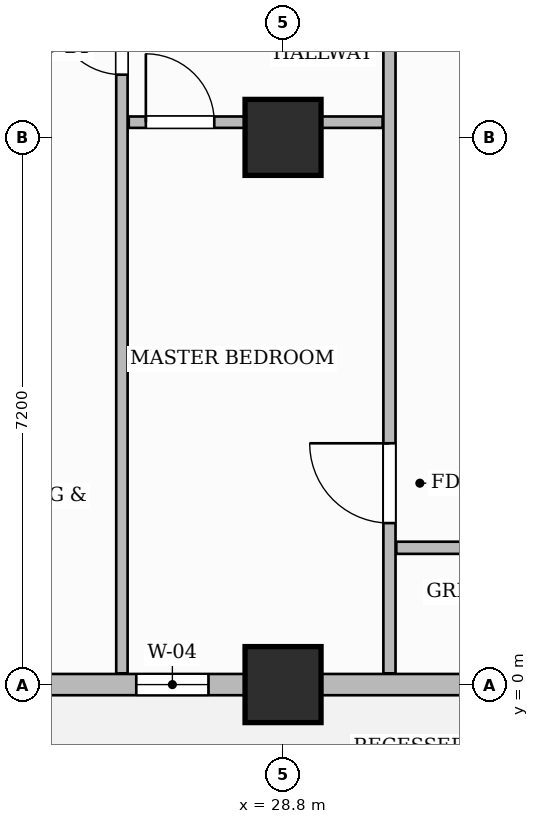
"""IFC4 building model, lengths in metres.
Left out: names, types, materials, properties, quantities, classifications, styles, units other than length and angle.
Written with IfcOpenShell. Run it as: python <this file> out.ifc"""

import sys

from ifc_helpers import new_model, si_unit, direction, frame, frame_2d, origin, origin_2d, place, context, subcontext, project, spatial, rectangle, extrude, source, transform, mapped, element, fill, save


model = new_model("IFC4")
c1 = context("Model", 3, precision=1e-05, world=origin(), true_north=direction((0.0, 1.0)))
c2 = subcontext(c1, "Body", "Model", "MODEL_VIEW")
j1 = project(units=[si_unit("LENGTHUNIT", "METRE"), si_unit("PLANEANGLEUNIT", "RADIAN")], contexts=[c1])
p1 = place(None, origin())
s1 = spatial("IfcSite", under=j1, at=p1, CompositionType="ELEMENT")
p2 = place(p1, origin())
s2 = spatial("IfcBuilding", under=s1, at=p2, CompositionType="ELEMENT")
p3 = place(p2, frame((0.0, 0.0, 188.8)))
s3 = spatial("IfcBuildingStorey", under=s2, at=p3, CompositionType="ELEMENT", Elevation=188.8)
m1 = source(origin(), c2, "Body", "SweptSolid", [
    extrude(rectangle(XDim=1.0, YDim=1.0, at=origin_2d()), origin(), (0.0, 0.0, 1.0), 3.85),
])
for number, where, z_axis, x_axis in (
    (1, (28.8, 0.0, 0.0), (0.0, 0.0, 1.0), (1.0, 0.0, 0.0)),
    (2, (28.8, 7.2, 0.0), (0.0, 0.0, 1.0), (1.0, 0.0, 0.0)),
):
    element("IfcColumn", number, at=place(p3, frame(where, z_axis=z_axis, x_axis=x_axis)), inside=s3, PredefinedType="COLUMN", context=c2, shape_type="MappedRepresentation", body=[
        mapped(m1, transform((0.0, 0.0, 0.0), scale=1.0)),
    ])
p4 = place(p3, frame((30.2, 0.148, 0.0), z_axis=(0.0, 0.0, 1.0), x_axis=(0.0, 1.0, 0.0)))
e3 = element("IfcWall", 3, at=p4, inside=s3, PredefinedType="PARTITIONING", context=c2, shape_type="SweptSolid", body=[
    extrude(rectangle(XDim=9.312, YDim=0.16, at=frame_2d((4.656, 0.0))), origin(), (0.0, 0.0, 1.0), 3.6),
])
p5 = place(p4, frame((1.977, 0.0, 0.0)))
e4 = element("IfcOpeningElement", 4, at=p5, cuts=e3, PredefinedType="OPENING", context=c2, shape_type="SweptSolid", body=[
    extrude(rectangle(XDim=1.05, YDim=2.15, at=frame_2d((0.525, 1.075))), frame((0.0, 0.09, 0.0), z_axis=(0.0, -1.0, 0.0), x_axis=(1.0, 0.0, 0.0)), (0.0, 0.0, 1.0), 0.18),
])
p6 = place(p3, frame((30.29, 1.8, 0.0), z_axis=(0.0, 0.0, 1.0), x_axis=(1.0, 0.0, 0.0)))
e5 = element("IfcWall", 5, at=p6, inside=s3, PredefinedType="PARTITIONING", context=c2, shape_type="SweptSolid", body=[
    extrude(rectangle(XDim=19.37, YDim=0.16, at=frame_2d((9.685, 0.0))), origin(), (0.0, 0.0, 1.0), 3.6),
])
p7 = place(p6, frame((2.916, 0.0, 0.0)))
e6 = element("IfcOpeningElement", 6, at=p7, cuts=e5, PredefinedType="OPENING", context=c2, shape_type="SweptSolid", body=[
    extrude(rectangle(XDim=0.9, YDim=2.15, at=frame_2d((0.45, 1.075))), frame((0.0, 0.09, 0.0), z_axis=(0.0, -1.0, 0.0), x_axis=(1.0, 0.0, 0.0)), (0.0, 0.0, 1.0), 0.18),
])
p8 = place(p6, frame((9.66, 0.0, 0.0)))
e7 = element("IfcOpeningElement", 7, at=p8, cuts=e5, PredefinedType="OPENING", context=c2, shape_type="SweptSolid", body=[
    extrude(rectangle(XDim=0.9, YDim=2.15, at=frame_2d((0.45, 1.075))), frame((0.0, 0.09, 0.0), z_axis=(0.0, -1.0, 0.0), x_axis=(1.0, 0.0, 0.0)), (0.0, 0.0, 1.0), 0.18),
])
p9 = place(p6, frame((15.86, 0.0, 0.0)))
e8 = element("IfcOpeningElement", 8, at=p9, cuts=e5, PredefinedType="OPENING", context=c2, shape_type="SweptSolid", body=[
    extrude(rectangle(XDim=0.9, YDim=2.15, at=frame_2d((0.45, 1.075))), frame((0.0, 0.09, 0.0), z_axis=(0.0, -1.0, 0.0), x_axis=(1.0, 0.0, 0.0)), (0.0, 0.0, 1.0), 0.18),
])
p10 = place(p3, frame((26.68, 0.148, 0.0), z_axis=(0.0, 0.0, 1.0), x_axis=(0.0, 1.0, 0.0)))
e9 = element("IfcWall", 9, at=p10, inside=s3, PredefinedType="PARTITIONING", context=c2, shape_type="SweptSolid", body=[
    extrude(rectangle(XDim=9.312, YDim=0.15, at=frame_2d((4.656, 0.0))), origin(), (0.0, 0.0, 1.0), 3.6),
])
p11 = place(p10, frame((7.877, 0.0, 0.0)))
e10 = element("IfcOpeningElement", 10, at=p11, cuts=e9, PredefinedType="OPENING", context=c2, shape_type="SweptSolid", body=[
    extrude(rectangle(XDim=0.9, YDim=2.15, at=frame_2d((0.45, 1.075))), frame((0.0, 0.085, 0.0), z_axis=(0.0, -1.0, 0.0), x_axis=(1.0, 0.0, 0.0)), (0.0, 0.0, 1.0), 0.17),
])
p12 = place(p3, frame((26.77, 7.4, 0.0), z_axis=(0.0, 0.0, 1.0), x_axis=(1.0, 0.0, 0.0)))
e11 = element("IfcWall", 11, at=p12, inside=s3, PredefinedType="PARTITIONING", context=c2, shape_type="SweptSolid", body=[
    extrude(rectangle(XDim=3.34, YDim=0.15, at=frame_2d((1.67, 0.0))), origin(), (0.0, 0.0, 1.0), 3.085),
])
p13 = place(p12, frame((0.225, 0.0, 0.0)))
e12 = element("IfcOpeningElement", 12, at=p13, cuts=e11, PredefinedType="OPENING", context=c2, shape_type="SweptSolid", body=[
    extrude(rectangle(XDim=0.9, YDim=2.15, at=frame_2d((0.45, 1.075))), frame((0.0, 0.085, 0.0), z_axis=(0.0, -1.0, 0.0), x_axis=(1.0, 0.0, 0.0)), (0.0, 0.0, 1.0), 0.17),
])
p14 = place(p3, frame((14.4, 0.0, 0.0), z_axis=(0.0, 0.0, 1.0), x_axis=(1.0, 0.0, 0.0)))
e13 = element("IfcWall", 13, at=p14, inside=s3, PredefinedType="SOLIDWALL", context=c2, shape_type="SweptSolid", body=[
    extrude(rectangle(XDim=35.4, YDim=0.28, at=frame_2d((17.7, 0.0))), origin(), (0.0, 0.0, 1.0), 3.085),
])
p15 = place(p14, frame((0.85, 0.0, 0.0)))
e14 = element("IfcOpeningElement", 14, at=p15, cuts=e13, PredefinedType="OPENING", context=c2, shape_type="SweptSolid", body=[
    extrude(rectangle(XDim=1.2, YDim=2.2, at=frame_2d((0.6, 1.1))), frame((0.0, 0.15, 0.0), z_axis=(0.0, -1.0, 0.0), x_axis=(1.0, 0.0, 0.0)), (0.0, 0.0, 1.0), 0.3),
])
p16 = place(p14, frame((2.596, 0.0, 0.8)))
e15 = element("IfcOpeningElement", 15, at=p16, cuts=e13, PredefinedType="OPENING", context=c2, shape_type="SweptSolid", body=[
    extrude(rectangle(XDim=0.95, YDim=1.75, at=frame_2d((0.475, 0.875))), frame((0.0, 0.15, 0.0), z_axis=(0.0, -1.0, 0.0), x_axis=(1.0, 0.0, 0.0)), (0.0, 0.0, 1.0), 0.3),
])
p17 = place(p14, frame((4.204, 0.0, 0.8)))
e16 = element("IfcOpeningElement", 16, at=p17, cuts=e13, PredefinedType="OPENING", context=c2, shape_type="SweptSolid", body=[
    extrude(rectangle(XDim=1.8, YDim=1.85, at=frame_2d((0.9, 0.925))), frame((0.0, 0.15, 0.0), z_axis=(0.0, -1.0, 0.0), x_axis=(1.0, 0.0, 0.0)), (0.0, 0.0, 1.0), 0.3),
])
p18 = place(p14, frame((9.415, 0.0, 0.8)))
e17 = element("IfcOpeningElement", 17, at=p18, cuts=e13, PredefinedType="OPENING", context=c2, shape_type="SweptSolid", body=[
    extrude(rectangle(XDim=1.8, YDim=1.85, at=frame_2d((0.9, 0.925))), frame((0.0, 0.15, 0.0), z_axis=(0.0, -1.0, 0.0), x_axis=(1.0, 0.0, 0.0)), (0.0, 0.0, 1.0), 0.3),
])
p19 = place(p14, frame((12.469, 0.0, 0.8)))
e18 = element("IfcOpeningElement", 18, at=p19, cuts=e13, PredefinedType="OPENING", context=c2, shape_type="SweptSolid", body=[
    extrude(rectangle(XDim=0.95, YDim=1.75, at=frame_2d((0.475, 0.875))), frame((0.0, 0.15, 0.0), z_axis=(0.0, -1.0, 0.0), x_axis=(1.0, 0.0, 0.0)), (0.0, 0.0, 1.0), 0.3),
])
p20 = place(p14, frame((16.804, 0.0, 0.8)))
e19 = element("IfcOpeningElement", 19, at=p20, cuts=e13, PredefinedType="OPENING", context=c2, shape_type="SweptSolid", body=[
    extrude(rectangle(XDim=1.8, YDim=1.85, at=frame_2d((0.9, 0.925))), frame((0.0, 0.15, 0.0), z_axis=(0.0, -1.0, 0.0), x_axis=(1.0, 0.0, 0.0)), (0.0, 0.0, 1.0), 0.3),
])
p21 = place(p14, frame((21.521, 0.0, 0.8)))
e20 = element("IfcOpeningElement", 20, at=p21, cuts=e13, PredefinedType="OPENING", context=c2, shape_type="SweptSolid", body=[
    extrude(rectangle(XDim=0.95, YDim=1.75, at=frame_2d((0.475, 0.875))), frame((0.0, 0.15, 0.0), z_axis=(0.0, -1.0, 0.0), x_axis=(1.0, 0.0, 0.0)), (0.0, 0.0, 1.0), 0.3),
])
p22 = place(p14, frame((23.904, 0.0, 0.8)))
e21 = element("IfcOpeningElement", 21, at=p22, cuts=e13, PredefinedType="OPENING", context=c2, shape_type="SweptSolid", body=[
    extrude(rectangle(XDim=1.8, YDim=1.85, at=frame_2d((0.9, 0.925))), frame((0.0, 0.15, 0.0), z_axis=(0.0, -1.0, 0.0), x_axis=(1.0, 0.0, 0.0)), (0.0, 0.0, 1.0), 0.3),
])
p23 = place(p14, frame((29.681, 0.0, 0.8)))
e22 = element("IfcOpeningElement", 22, at=p23, cuts=e13, PredefinedType="OPENING", context=c2, shape_type="SweptSolid", body=[
    extrude(rectangle(XDim=1.8, YDim=1.85, at=frame_2d((0.9, 0.925))), frame((0.0, 0.15, 0.0), z_axis=(0.0, -1.0, 0.0), x_axis=(1.0, 0.0, 0.0)), (0.0, 0.0, 1.0), 0.3),
])
p24 = place(p14, frame((32.327, 0.0, 0.8)))
e23 = element("IfcOpeningElement", 23, at=p24, cuts=e13, PredefinedType="OPENING", context=c2, shape_type="SweptSolid", body=[
    extrude(rectangle(XDim=1.8, YDim=1.85, at=frame_2d((0.9, 0.925))), frame((0.0, 0.15, 0.0), z_axis=(0.0, -1.0, 0.0), x_axis=(1.0, 0.0, 0.0)), (0.0, 0.0, 1.0), 0.3),
])
m2 = source(origin(), c2, "Body", "SweptSolid", [
    extrude(rectangle(XDim=1.05, YDim=2.15, at=frame_2d((0.525, 1.075))), frame((0.0, 0.025, 0.0), z_axis=(0.0, -1.0, 0.0), x_axis=(1.0, 0.0, 0.0)), (0.0, 0.0, 1.0), 0.05),
])
p25 = place(p5, origin())
e24 = element("IfcDoor", 24, at=p25, inside=s3, OperationType="SINGLE_SWING_RIGHT", PredefinedType="DOOR", context=c2, shape_type="MappedRepresentation", body=[
    mapped(m2, transform((0.0, 0.0, 0.0), scale=1.0)),
])
fill(e4, e24)
m3 = source(origin(), c2, "Body", "SweptSolid", [
    extrude(rectangle(XDim=0.9, YDim=2.15, at=frame_2d((0.45, 1.075))), frame((0.0, 0.025, 0.0), z_axis=(0.0, -1.0, 0.0), x_axis=(1.0, 0.0, 0.0)), (0.0, 0.0, 1.0), 0.05),
])
p26 = place(p11, origin())
e25 = element("IfcDoor", 25, at=p26, inside=s3, OperationType="SINGLE_SWING_RIGHT", PredefinedType="DOOR", context=c2, shape_type="MappedRepresentation", body=[
    mapped(m3, transform((0.0, 0.0, 0.0), scale=1.0)),
])
fill(e10, e25)
p27 = place(p13, origin())
e26 = element("IfcDoor", 26, at=p27, inside=s3, OperationType="SINGLE_SWING_LEFT", PredefinedType="DOOR", context=c2, shape_type="MappedRepresentation", body=[
    mapped(m3, transform((0.0, 0.0, 0.0), scale=1.0)),
])
fill(e12, e26)
m4 = source(origin(), c2, "Body", "SweptSolid", [
    extrude(rectangle(XDim=0.95, YDim=1.75, at=frame_2d((0.475, 0.875))), frame((0.0, 0.03, 0.0), z_axis=(0.0, -1.0, 0.0), x_axis=(1.0, 0.0, 0.0)), (0.0, 0.0, 1.0), 0.06),
])
p28 = place(p19, origin())
e27 = element("IfcWindow", 27, at=p28, inside=s3, PartitioningType="SINGLE_PANEL", PredefinedType="WINDOW", context=c2, shape_type="MappedRepresentation", body=[
    mapped(m4, transform((0.0, 0.0, 0.0), scale=1.0)),
])
fill(e18, e27)
save(model, sys.argv[1])
